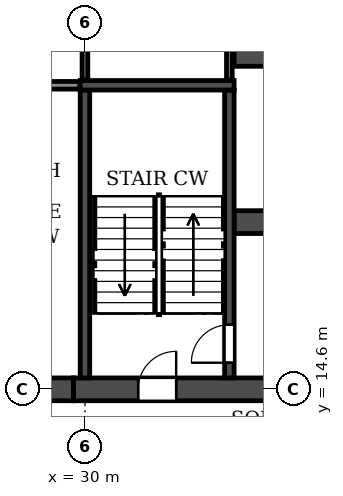
"""IFC4 building model, lengths in metres.
Left out: names, types, materials, properties, quantities, classifications, styles, units other than length and angle.
Written with IfcOpenShell. Run it as: python <this file> out.ifc"""

import sys

from ifc_helpers import new_model, si_unit, direction, frame, frame_2d, origin, place, context, subcontext, project, spatial, rectangle, extrude, element, fill, save


model = new_model("IFC4")
c1 = context("Model", 3, precision=1e-05, world=origin(), true_north=direction((0.0, 1.0)))
c2 = subcontext(c1, "Body", "Model", "MODEL_VIEW")
j1 = project(units=[si_unit("LENGTHUNIT", "METRE"), si_unit("PLANEANGLEUNIT", "RADIAN")], contexts=[c1])
p1 = place(None, origin())
s1 = spatial("IfcSite", under=j1, at=p1, CompositionType="ELEMENT")
p2 = place(p1, origin())
s2 = spatial("IfcBuilding", under=s1, at=p2, CompositionType="ELEMENT")
p3 = place(p2, frame((0.0, 0.0, 66.3)))
s3 = spatial("IfcBuildingStorey", under=s2, at=p3, CompositionType="ELEMENT", Elevation=66.3)
p4 = place(p3, frame((24.9, 14.6, 0.0), z_axis=(0.0, 0.0, 1.0), x_axis=(1.0, 0.0, 0.0)))
e1 = element("IfcWall", 1, at=p4, inside=s3, PredefinedType="SHEAR", context=c2, shape_type="SweptSolid", body=[
    extrude(rectangle(XDim=4.8, YDim=0.6, at=frame_2d((2.4, 0.0))), origin(), (0.0, 0.0, 1.0), 6.36),
])
p5 = place(p4, frame((1.9, 0.0, 0.0)))
e2 = element("IfcOpeningElement", 2, at=p5, cuts=e1, PredefinedType="OPENING", context=c2, shape_type="SweptSolid", body=[
    extrude(rectangle(XDim=1.0, YDim=2.1, at=frame_2d((0.5, 1.05))), frame((0.0, 0.31, 0.0), z_axis=(0.0, -1.0, 0.0), x_axis=(1.0, 0.0, 0.0)), (0.0, 0.0, 1.0), 0.62),
])
p6 = place(p3, frame((29.7, 14.6, 0.0), z_axis=(0.0, 0.0, 1.0), x_axis=(1.0, 0.0, 0.0)))
e3 = element("IfcWall", 3, at=p6, inside=s3, PredefinedType="SOLIDWALL", context=c2, shape_type="SweptSolid", body=[
    extrude(rectangle(XDim=42.6, YDim=0.6, at=frame_2d((21.3, 0.0))), origin(), (0.0, 0.0, 1.0), 6.36),
])
p7 = place(p6, frame((1.7, 0.0, 0.0)))
e4 = element("IfcOpeningElement", 4, at=p7, cuts=e3, PredefinedType="OPENING", context=c2, shape_type="SweptSolid", body=[
    extrude(rectangle(XDim=1.0, YDim=2.1, at=frame_2d((0.5, 1.05))), frame((0.0, 0.31, 0.0), z_axis=(0.0, -1.0, 0.0), x_axis=(1.0, 0.0, 0.0)), (0.0, 0.0, 1.0), 0.62),
])
p8 = place(p6, frame((13.0, 0.0, 0.0)))
e5 = element("IfcOpeningElement", 5, at=p8, cuts=e3, PredefinedType="OPENING", context=c2, shape_type="SweptSolid", body=[
    extrude(rectangle(XDim=1.0, YDim=2.1, at=frame_2d((0.5, 1.05))), frame((0.0, 0.31, 0.0), z_axis=(0.0, -1.0, 0.0), x_axis=(1.0, 0.0, 0.0)), (0.0, 0.0, 1.0), 0.62),
])
p9 = place(p6, frame((16.9, 0.0, 0.0)))
e6 = element("IfcOpeningElement", 6, at=p9, cuts=e3, PredefinedType="OPENING", context=c2, shape_type="SweptSolid", body=[
    extrude(rectangle(XDim=1.0, YDim=2.1, at=frame_2d((0.5, 1.05))), frame((0.0, 0.31, 0.0), z_axis=(0.0, -1.0, 0.0), x_axis=(1.0, 0.0, 0.0)), (0.0, 0.0, 1.0), 0.62),
])
p10 = place(p6, frame((20.8, 0.0, 0.0)))
e7 = element("IfcOpeningElement", 7, at=p10, cuts=e3, PredefinedType="OPENING", context=c2, shape_type="SweptSolid", body=[
    extrude(rectangle(XDim=1.0, YDim=2.1, at=frame_2d((0.5, 1.05))), frame((0.0, 0.31, 0.0), z_axis=(0.0, -1.0, 0.0), x_axis=(1.0, 0.0, 0.0)), (0.0, 0.0, 1.0), 0.62),
])
p11 = place(p6, frame((23.4, 0.0, 0.0)))
e8 = element("IfcOpeningElement", 8, at=p11, cuts=e3, PredefinedType="OPENING", context=c2, shape_type="SweptSolid", body=[
    extrude(rectangle(XDim=1.0, YDim=2.1, at=frame_2d((0.5, 1.05))), frame((0.0, 0.31, 0.0), z_axis=(0.0, -1.0, 0.0), x_axis=(1.0, 0.0, 0.0)), (0.0, 0.0, 1.0), 0.62),
])
p12 = place(p6, frame((27.3, 0.0, 0.0)))
e9 = element("IfcOpeningElement", 9, at=p12, cuts=e3, PredefinedType="OPENING", context=c2, shape_type="SweptSolid", body=[
    extrude(rectangle(XDim=1.0, YDim=2.1, at=frame_2d((0.5, 1.05))), frame((0.0, 0.31, 0.0), z_axis=(0.0, -1.0, 0.0), x_axis=(1.0, 0.0, 0.0)), (0.0, 0.0, 1.0), 0.62),
])
p13 = place(p6, frame((39.9, 0.0, 0.0)))
e10 = element("IfcOpeningElement", 10, at=p13, cuts=e3, PredefinedType="OPENING", context=c2, shape_type="SweptSolid", body=[
    extrude(rectangle(XDim=1.0, YDim=2.1, at=frame_2d((0.5, 1.05))), frame((0.0, 0.31, 0.0), z_axis=(0.0, -1.0, 0.0), x_axis=(1.0, 0.0, 0.0)), (0.0, 0.0, 1.0), 0.62),
])
p14 = place(p3, frame((33.925, 19.0, 0.0), z_axis=(0.0, 0.0, 1.0), x_axis=(1.0, 0.0, 0.0)))
e11 = element("IfcWall", 11, at=p14, inside=s3, PredefinedType="SOLIDWALL", context=c2, shape_type="SweptSolid", body=[
    extrude(rectangle(XDim=34.15, YDim=0.6, at=frame_2d((17.075, 0.0))), origin(), (0.0, 0.0, 1.0), 6.36),
])
p15 = place(p14, frame((16.175, 0.0, 0.0)))
e12 = element("IfcOpeningElement", 12, at=p15, cuts=e11, PredefinedType="OPENING", context=c2, shape_type="SweptSolid", body=[
    extrude(rectangle(XDim=1.8, YDim=2.1, at=frame_2d((0.9, 1.05))), frame((0.0, 0.31, 0.0), z_axis=(0.0, -1.0, 0.0), x_axis=(1.0, 0.0, 0.0)), (0.0, 0.0, 1.0), 0.62),
])
p16 = place(p14, frame((1.525, 0.0, 0.0)))
e13 = element("IfcOpeningElement", 13, at=p16, cuts=e11, PredefinedType="OPENING", context=c2, shape_type="SweptSolid", body=[
    extrude(rectangle(XDim=1.8, YDim=2.1, at=frame_2d((0.9, 1.05))), frame((0.0, 0.31, 0.0), z_axis=(0.0, -1.0, 0.0), x_axis=(1.0, 0.0, 0.0)), (0.0, 0.0, 1.0), 0.62),
])
p17 = place(p14, frame((8.725, 0.0, 0.0)))
e14 = element("IfcOpeningElement", 14, at=p17, cuts=e11, PredefinedType="OPENING", context=c2, shape_type="SweptSolid", body=[
    extrude(rectangle(XDim=1.1, YDim=2.1, at=frame_2d((0.55, 1.05))), frame((0.0, 0.31, 0.0), z_axis=(0.0, -1.0, 0.0), x_axis=(1.0, 0.0, 0.0)), (0.0, 0.0, 1.0), 0.62),
])
p18 = place(p14, frame((11.325, 0.0, 0.0)))
e15 = element("IfcOpeningElement", 15, at=p18, cuts=e11, PredefinedType="OPENING", context=c2, shape_type="SweptSolid", body=[
    extrude(rectangle(XDim=1.1, YDim=2.1, at=frame_2d((0.55, 1.05))), frame((0.0, 0.31, 0.0), z_axis=(0.0, -1.0, 0.0), x_axis=(1.0, 0.0, 0.0)), (0.0, 0.0, 1.0), 0.62),
])
p19 = place(p14, frame((13.925, 0.0, 0.0)))
e16 = element("IfcOpeningElement", 16, at=p19, cuts=e11, PredefinedType="OPENING", context=c2, shape_type="SweptSolid", body=[
    extrude(rectangle(XDim=1.1, YDim=2.1, at=frame_2d((0.55, 1.05))), frame((0.0, 0.31, 0.0), z_axis=(0.0, -1.0, 0.0), x_axis=(1.0, 0.0, 0.0)), (0.0, 0.0, 1.0), 0.62),
])
p20 = place(p14, frame((19.125, 0.0, 0.0)))
e17 = element("IfcOpeningElement", 17, at=p20, cuts=e11, PredefinedType="OPENING", context=c2, shape_type="SweptSolid", body=[
    extrude(rectangle(XDim=1.1, YDim=2.1, at=frame_2d((0.55, 1.05))), frame((0.0, 0.31, 0.0), z_axis=(0.0, -1.0, 0.0), x_axis=(1.0, 0.0, 0.0)), (0.0, 0.0, 1.0), 0.62),
])
p21 = place(p14, frame((21.725, 0.0, 0.0)))
e18 = element("IfcOpeningElement", 18, at=p21, cuts=e11, PredefinedType="OPENING", context=c2, shape_type="SweptSolid", body=[
    extrude(rectangle(XDim=1.1, YDim=2.1, at=frame_2d((0.55, 1.05))), frame((0.0, 0.31, 0.0), z_axis=(0.0, -1.0, 0.0), x_axis=(1.0, 0.0, 0.0)), (0.0, 0.0, 1.0), 0.62),
])
p22 = place(p14, frame((24.325, 0.0, 0.0)))
e19 = element("IfcOpeningElement", 19, at=p22, cuts=e11, PredefinedType="OPENING", context=c2, shape_type="SweptSolid", body=[
    extrude(rectangle(XDim=1.1, YDim=2.1, at=frame_2d((0.55, 1.05))), frame((0.0, 0.31, 0.0), z_axis=(0.0, -1.0, 0.0), x_axis=(1.0, 0.0, 0.0)), (0.0, 0.0, 1.0), 0.62),
])
p23 = place(p14, frame((30.825, 0.0, 0.0)))
e20 = element("IfcOpeningElement", 20, at=p23, cuts=e11, PredefinedType="OPENING", context=c2, shape_type="SweptSolid", body=[
    extrude(rectangle(XDim=1.8, YDim=2.1, at=frame_2d((0.9, 1.05))), frame((0.0, 0.31, 0.0), z_axis=(0.0, -1.0, 0.0), x_axis=(1.0, 0.0, 0.0)), (0.0, 0.0, 1.0), 0.62),
])
p24 = place(p3, frame((33.925, 23.4, 0.0), z_axis=(0.0, 0.0, 1.0), x_axis=(1.0, 0.0, 0.0)))
e21 = element("IfcWall", 21, at=p24, inside=s3, PredefinedType="SOLIDWALL", context=c2, shape_type="SweptSolid", body=[
    extrude(rectangle(XDim=34.15, YDim=0.6, at=frame_2d((17.075, 0.0))), origin(), (0.0, 0.0, 1.0), 6.36),
])
p25 = place(p24, frame((16.175, 0.0, 0.0)))
e22 = element("IfcOpeningElement", 22, at=p25, cuts=e21, PredefinedType="OPENING", context=c2, shape_type="SweptSolid", body=[
    extrude(rectangle(XDim=1.8, YDim=2.1, at=frame_2d((0.9, 1.05))), frame((0.0, 0.31, 0.0), z_axis=(0.0, -1.0, 0.0), x_axis=(1.0, 0.0, 0.0)), (0.0, 0.0, 1.0), 0.62),
])
p26 = place(p24, frame((11.025, 0.0, 0.0)))
e23 = element("IfcOpeningElement", 23, at=p26, cuts=e21, PredefinedType="OPENING", context=c2, shape_type="SweptSolid", body=[
    extrude(rectangle(XDim=1.1, YDim=2.1, at=frame_2d((0.55, 1.05))), frame((0.0, 0.31, 0.0), z_axis=(0.0, -1.0, 0.0), x_axis=(1.0, 0.0, 0.0)), (0.0, 0.0, 1.0), 0.62),
])
p27 = place(p3, frame((30.0, 14.9, 0.0), z_axis=(0.0, 0.0, 1.0), x_axis=(0.0, 1.0, 0.0)))
e24 = element("IfcWall", 24, at=p27, inside=s3, PredefinedType="SOLIDWALL", context=c2, shape_type="SweptSolid", body=[
    extrude(rectangle(XDim=7.575, YDim=0.25, at=frame_2d((3.788, 0.0))), origin(), (0.0, 0.0, 1.0), 6.36),
])
p28 = place(p3, frame((33.8, 14.9, 0.0), z_axis=(0.0, 0.0, 1.0), x_axis=(0.0, 1.0, 0.0)))
e25 = element("IfcWall", 25, at=p28, inside=s3, PredefinedType="SOLIDWALL", context=c2, shape_type="SweptSolid", body=[
    extrude(rectangle(XDim=7.575, YDim=0.25, at=frame_2d((3.788, 0.0))), origin(), (0.0, 0.0, 1.0), 6.36),
])
p29 = place(p28, frame((0.4, 0.0, 0.0)))
e26 = element("IfcOpeningElement", 26, at=p29, cuts=e25, PredefinedType="OPENING", context=c2, shape_type="SweptSolid", body=[
    extrude(rectangle(XDim=1.0, YDim=2.1, at=frame_2d((0.5, 1.05))), frame((0.0, 0.135, 0.0), z_axis=(0.0, -1.0, 0.0), x_axis=(1.0, 0.0, 0.0)), (0.0, 0.0, 1.0), 0.27),
])
p30 = place(p3, frame((29.875, 22.6, 0.0), z_axis=(0.0, 0.0, 1.0), x_axis=(1.0, 0.0, 0.0)))
e27 = element("IfcWall", 27, at=p30, inside=s3, PredefinedType="SOLIDWALL", context=c2, shape_type="SweptSolid", body=[
    extrude(rectangle(XDim=4.05, YDim=0.25, at=frame_2d((2.025, 0.0))), origin(), (0.0, 0.0, 1.0), 6.36),
])
p31 = place(p3, frame((24.735, 22.6, 0.0), z_axis=(0.0, 0.0, 1.0), x_axis=(1.0, 0.0, 0.0)))
e28 = element("IfcWall", 28, at=p31, inside=s3, PredefinedType="PARTITIONING", context=c2, shape_type="SweptSolid", body=[
    extrude(rectangle(XDim=5.13, YDim=0.2, at=frame_2d((2.565, 0.0))), origin(), (0.0, 0.0, 1.0), 6.36),
])
for number, where, z_axis, x_axis in (
    (29, (30.0, 22.735, 0.0), (0.0, 0.0, 1.0), (0.0, 1.0, 0.0)),
    (30, (33.8, 22.735, 0.0), (0.0, 0.0, 1.0), (0.0, 1.0, 0.0)),
):
    element("IfcWall", number, at=place(p3, frame(where, z_axis=z_axis, x_axis=x_axis)), inside=s3, PredefinedType="PARTITIONING", context=c2, shape_type="SweptSolid", body=[
        extrude(rectangle(XDim=4.755, YDim=0.15, at=frame_2d((2.377, 0.0))), origin(), (0.0, 0.0, 1.0), 6.36),
    ])
p32 = place(p7, origin())
e31 = element("IfcDoor", 31, at=p32, inside=s3, OperationType="SINGLE_SWING_RIGHT", PredefinedType="DOOR", context=c2, shape_type="SweptSolid", body=[
    extrude(rectangle(XDim=1.0, YDim=2.1, at=frame_2d((0.5, 1.05))), frame((0.0, 0.025, 0.0), z_axis=(0.0, -1.0, 0.0), x_axis=(1.0, 0.0, 0.0)), (0.0, 0.0, 1.0), 0.05),
])
fill(e4, e31)
p33 = place(p29, origin())
e32 = element("IfcDoor", 32, at=p33, inside=s3, OperationType="SINGLE_SWING_LEFT", PredefinedType="DOOR", context=c2, shape_type="SweptSolid", body=[
    extrude(rectangle(XDim=1.0, YDim=2.1, at=frame_2d((0.5, 1.05))), frame((0.0, 0.025, 0.0), z_axis=(0.0, -1.0, 0.0), x_axis=(1.0, 0.0, 0.0)), (0.0, 0.0, 1.0), 0.05),
])
fill(e26, e32)
save(model, sys.argv[1])
